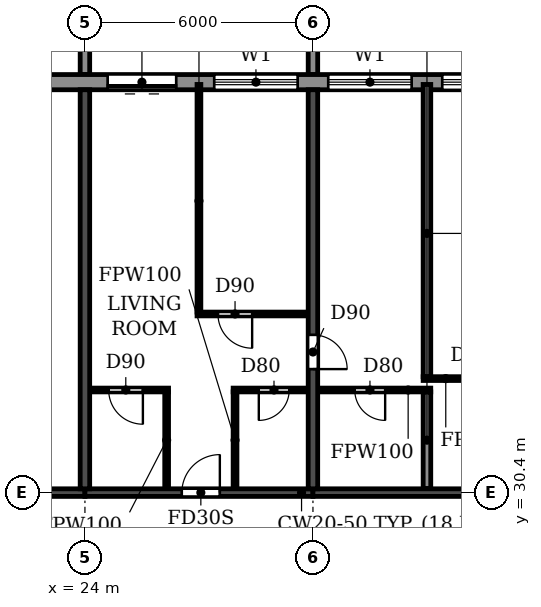
"""IFC4 building model, lengths in metres.
Left out: names, types, materials, properties, quantities, classifications, styles, units other than length and angle.
Written with IfcOpenShell. Run it as: python <this file> out.ifc"""

import sys

from ifc_helpers import new_model, si_unit, direction, frame, frame_2d, origin, place, context, subcontext, project, spatial, polyline, rectangle, outline, extrude, source, transform, mapped, element, fill, save


model = new_model("IFC4")
c1 = context("Model", 3, precision=1e-05, world=origin(), true_north=direction((0.0, 1.0)))
c2 = subcontext(c1, "Body", "Model", "MODEL_VIEW")
j1 = project(units=[si_unit("LENGTHUNIT", "METRE"), si_unit("PLANEANGLEUNIT", "RADIAN")], contexts=[c1])
p1 = place(None, origin())
s1 = spatial("IfcSite", under=j1, at=p1, CompositionType="ELEMENT")
p2 = place(p1, origin())
s2 = spatial("IfcBuilding", under=s1, at=p2, CompositionType="ELEMENT")
p3 = place(p2, frame((0.0, 0.0, 231.3)))
s3 = spatial("IfcBuildingStorey", under=s2, at=p3, CompositionType="ELEMENT", Elevation=231.3)
p4 = place(p3, frame((24.0, 30.5, 0.0), z_axis=(0.0, 0.0, 1.0), x_axis=(0.0, 1.0, 0.0)))
e1 = element("IfcWall", 1, at=p4, inside=s3, PredefinedType="SHEAR", context=c2, shape_type="SweptSolid", body=[
    extrude(rectangle(XDim=10.5, YDim=0.25, at=frame_2d((5.25, 0.0))), origin(), (0.0, 0.0, 1.0), 3.08),
])
p5 = place(p3, frame((30.0, 30.5, 0.0), z_axis=(0.0, 0.0, 1.0), x_axis=(0.0, 1.0, 0.0)))
e2 = element("IfcWall", 2, at=p5, inside=s3, PredefinedType="SHEAR", context=c2, shape_type="SweptSolid", body=[
    extrude(rectangle(XDim=10.5, YDim=0.25, at=frame_2d((5.25, 0.0))), origin(), (0.0, 0.0, 1.0), 3.08),
])
p6 = place(p5, frame((3.15, 0.0, 0.0)))
e3 = element("IfcOpeningElement", 3, at=p6, cuts=e2, PredefinedType="OPENING", context=c2, shape_type="SweptSolid", body=[
    extrude(rectangle(XDim=0.9, YDim=2.1, at=frame_2d((0.45, 1.05))), frame((0.0, 0.135, 0.0), z_axis=(0.0, -1.0, 0.0), x_axis=(1.0, 0.0, 0.0)), (0.0, 0.0, 1.0), 0.27),
])
p7 = place(p3, frame((18.2, 30.4, 0.0), z_axis=(0.0, 0.0, 1.0), x_axis=(1.0, 0.0, 0.0)))
e4 = element("IfcWall", 4, at=p7, inside=s3, PredefinedType="SHEAR", context=c2, shape_type="SweptSolid", body=[
    extrude(rectangle(XDim=5.8, YDim=0.2, at=frame_2d((2.9, 0.0))), origin(), (0.0, 0.0, 1.0), 2.48),
])
p8 = place(p7, frame((2.3, 0.0, 0.0)))
e5 = element("IfcOpeningElement", 5, at=p8, cuts=e4, PredefinedType="OPENING", context=c2, shape_type="SweptSolid", body=[
    extrude(rectangle(XDim=1.0, YDim=2.1, at=frame_2d((0.5, 1.05))), frame((0.0, 0.11, 0.0), z_axis=(0.0, -1.0, 0.0), x_axis=(1.0, 0.0, 0.0)), (0.0, 0.0, 1.0), 0.22),
])
p9 = place(p3, frame((24.0, 30.4, 0.0), z_axis=(0.0, 0.0, 1.0), x_axis=(1.0, 0.0, 0.0)))
e6 = element("IfcWall", 6, at=p9, inside=s3, PredefinedType="SHEAR", context=c2, shape_type="SweptSolid", body=[
    extrude(rectangle(XDim=6.0, YDim=0.2, at=frame_2d((3.0, 0.0))), origin(), (0.0, 0.0, 1.0), 2.48),
])
p10 = place(p9, frame((2.55, 0.0, 0.0)))
e7 = element("IfcOpeningElement", 7, at=p10, cuts=e6, PredefinedType="OPENING", context=c2, shape_type="SweptSolid", body=[
    extrude(rectangle(XDim=1.0, YDim=2.1, at=frame_2d((0.5, 1.05))), frame((0.0, 0.11, 0.0), z_axis=(0.0, -1.0, 0.0), x_axis=(1.0, 0.0, 0.0)), (0.0, 0.0, 1.0), 0.22),
])
p11 = place(p3, frame((30.0, 30.4, 0.0), z_axis=(0.0, 0.0, 1.0), x_axis=(1.0, 0.0, 0.0)))
e8 = element("IfcWall", 8, at=p11, inside=s3, PredefinedType="SHEAR", context=c2, shape_type="SweptSolid", body=[
    extrude(rectangle(XDim=6.0, YDim=0.2, at=frame_2d((3.0, 0.0))), origin(), (0.0, 0.0, 1.0), 2.48),
])
p12 = place(p3, frame((79.317, 41.2, 0.0), z_axis=(0.0, 0.0, 1.0), x_axis=(-1.0, 0.0, 0.0)))
e9 = element("IfcWall", 9, at=p12, inside=s3, PredefinedType="STANDARD", context=c2, shape_type="SweptSolid", body=[
    extrude(rectangle(XDim=56.634, YDim=0.4, at=frame_2d((28.317, 0.0))), origin(), (0.0, 0.0, 1.0), 3.08),
])
p13 = place(p12, frame((52.917, 0.0, 0.0)))
e10 = element("IfcOpeningElement", 10, at=p13, cuts=e9, PredefinedType="OPENING", context=c2, shape_type="SweptSolid", body=[
    extrude(rectangle(XDim=1.8, YDim=2.4, at=frame_2d((0.9, 1.2))), frame((0.0, 0.21, 0.0), z_axis=(0.0, -1.0, 0.0), x_axis=(1.0, 0.0, 0.0)), (0.0, 0.0, 1.0), 0.42),
])
p14 = place(p12, frame((49.717, 0.0, 0.9)))
e11 = element("IfcOpeningElement", 11, at=p14, cuts=e9, PredefinedType="OPENING", context=c2, shape_type="SweptSolid", body=[
    extrude(rectangle(XDim=2.2, YDim=1.5, at=frame_2d((1.1, 0.75))), frame((0.0, 0.21, 0.0), z_axis=(0.0, -1.0, 0.0), x_axis=(1.0, 0.0, 0.0)), (0.0, 0.0, 1.0), 0.42),
])
p15 = place(p12, frame((46.717, 0.0, 0.9)))
e12 = element("IfcOpeningElement", 12, at=p15, cuts=e9, PredefinedType="OPENING", context=c2, shape_type="SweptSolid", body=[
    extrude(rectangle(XDim=2.2, YDim=1.5, at=frame_2d((1.1, 0.75))), frame((0.0, 0.21, 0.0), z_axis=(0.0, -1.0, 0.0), x_axis=(1.0, 0.0, 0.0)), (0.0, 0.0, 1.0), 0.42),
])
p16 = place(p12, frame((43.717, 0.0, 0.9)))
e13 = element("IfcOpeningElement", 13, at=p16, cuts=e9, PredefinedType="OPENING", context=c2, shape_type="SweptSolid", body=[
    extrude(rectangle(XDim=2.2, YDim=1.5, at=frame_2d((1.1, 0.75))), frame((0.0, 0.21, 0.0), z_axis=(0.0, -1.0, 0.0), x_axis=(1.0, 0.0, 0.0)), (0.0, 0.0, 1.0), 0.42),
])
p17 = place(p12, frame((40.717, 0.0, 0.9)))
e14 = element("IfcOpeningElement", 14, at=p17, cuts=e9, PredefinedType="OPENING", context=c2, shape_type="SweptSolid", body=[
    extrude(rectangle(XDim=2.2, YDim=1.5, at=frame_2d((1.1, 0.75))), frame((0.0, 0.21, 0.0), z_axis=(0.0, -1.0, 0.0), x_axis=(1.0, 0.0, 0.0)), (0.0, 0.0, 1.0), 0.42),
])
p18 = place(p12, frame((37.917, 0.0, 0.0)))
e15 = element("IfcOpeningElement", 15, at=p18, cuts=e9, PredefinedType="OPENING", context=c2, shape_type="SweptSolid", body=[
    extrude(rectangle(XDim=1.8, YDim=2.4, at=frame_2d((0.9, 1.2))), frame((0.0, 0.21, 0.0), z_axis=(0.0, -1.0, 0.0), x_axis=(1.0, 0.0, 0.0)), (0.0, 0.0, 1.0), 0.42),
])
p19 = place(p12, frame((34.717, 0.0, 0.9)))
e16 = element("IfcOpeningElement", 16, at=p19, cuts=e9, PredefinedType="OPENING", context=c2, shape_type="SweptSolid", body=[
    extrude(rectangle(XDim=2.2, YDim=1.5, at=frame_2d((1.1, 0.75))), frame((0.0, 0.21, 0.0), z_axis=(0.0, -1.0, 0.0), x_axis=(1.0, 0.0, 0.0)), (0.0, 0.0, 1.0), 0.42),
])
p20 = place(p12, frame((31.917, 0.0, 0.0)))
e17 = element("IfcOpeningElement", 17, at=p20, cuts=e9, PredefinedType="OPENING", context=c2, shape_type="SweptSolid", body=[
    extrude(rectangle(XDim=1.8, YDim=2.4, at=frame_2d((0.9, 1.2))), frame((0.0, 0.21, 0.0), z_axis=(0.0, -1.0, 0.0), x_axis=(1.0, 0.0, 0.0)), (0.0, 0.0, 1.0), 0.42),
])
p21 = place(p12, frame((28.717, 0.0, 0.9)))
e18 = element("IfcOpeningElement", 18, at=p21, cuts=e9, PredefinedType="OPENING", context=c2, shape_type="SweptSolid", body=[
    extrude(rectangle(XDim=2.2, YDim=1.5, at=frame_2d((1.1, 0.75))), frame((0.0, 0.21, 0.0), z_axis=(0.0, -1.0, 0.0), x_axis=(1.0, 0.0, 0.0)), (0.0, 0.0, 1.0), 0.42),
])
p22 = place(p12, frame((25.917, 0.0, 0.0)))
e19 = element("IfcOpeningElement", 19, at=p22, cuts=e9, PredefinedType="OPENING", context=c2, shape_type="SweptSolid", body=[
    extrude(rectangle(XDim=1.8, YDim=2.4, at=frame_2d((0.9, 1.2))), frame((0.0, 0.21, 0.0), z_axis=(0.0, -1.0, 0.0), x_axis=(1.0, 0.0, 0.0)), (0.0, 0.0, 1.0), 0.42),
])
p23 = place(p12, frame((22.717, 0.0, 0.9)))
e20 = element("IfcOpeningElement", 20, at=p23, cuts=e9, PredefinedType="OPENING", context=c2, shape_type="SweptSolid", body=[
    extrude(rectangle(XDim=2.2, YDim=1.5, at=frame_2d((1.1, 0.75))), frame((0.0, 0.21, 0.0), z_axis=(0.0, -1.0, 0.0), x_axis=(1.0, 0.0, 0.0)), (0.0, 0.0, 1.0), 0.42),
])
p24 = place(p12, frame((19.717, 0.0, 0.9)))
e21 = element("IfcOpeningElement", 21, at=p24, cuts=e9, PredefinedType="OPENING", context=c2, shape_type="SweptSolid", body=[
    extrude(rectangle(XDim=2.2, YDim=1.5, at=frame_2d((1.1, 0.75))), frame((0.0, 0.21, 0.0), z_axis=(0.0, -1.0, 0.0), x_axis=(1.0, 0.0, 0.0)), (0.0, 0.0, 1.0), 0.42),
])
p25 = place(p12, frame((16.717, 0.0, 0.9)))
e22 = element("IfcOpeningElement", 22, at=p25, cuts=e9, PredefinedType="OPENING", context=c2, shape_type="SweptSolid", body=[
    extrude(rectangle(XDim=2.2, YDim=1.5, at=frame_2d((1.1, 0.75))), frame((0.0, 0.21, 0.0), z_axis=(0.0, -1.0, 0.0), x_axis=(1.0, 0.0, 0.0)), (0.0, 0.0, 1.0), 0.42),
])
p26 = place(p12, frame((13.917, 0.0, 0.0)))
e23 = element("IfcOpeningElement", 23, at=p26, cuts=e9, PredefinedType="OPENING", context=c2, shape_type="SweptSolid", body=[
    extrude(rectangle(XDim=1.8, YDim=2.4, at=frame_2d((0.9, 1.2))), frame((0.0, 0.21, 0.0), z_axis=(0.0, -1.0, 0.0), x_axis=(1.0, 0.0, 0.0)), (0.0, 0.0, 1.0), 0.42),
])
p27 = place(p12, frame((10.717, 0.0, 0.9)))
e24 = element("IfcOpeningElement", 24, at=p27, cuts=e9, PredefinedType="OPENING", context=c2, shape_type="SweptSolid", body=[
    extrude(rectangle(XDim=2.2, YDim=1.5, at=frame_2d((1.1, 0.75))), frame((0.0, 0.21, 0.0), z_axis=(0.0, -1.0, 0.0), x_axis=(1.0, 0.0, 0.0)), (0.0, 0.0, 1.0), 0.42),
])
p28 = place(p12, frame((7.917, 0.0, 0.0)))
e25 = element("IfcOpeningElement", 25, at=p28, cuts=e9, PredefinedType="OPENING", context=c2, shape_type="SweptSolid", body=[
    extrude(rectangle(XDim=1.8, YDim=2.4, at=frame_2d((0.9, 1.2))), frame((0.0, 0.21, 0.0), z_axis=(0.0, -1.0, 0.0), x_axis=(1.0, 0.0, 0.0)), (0.0, 0.0, 1.0), 0.42),
])
p29 = place(p12, frame((4.717, 0.0, 0.9)))
e26 = element("IfcOpeningElement", 26, at=p29, cuts=e9, PredefinedType="OPENING", context=c2, shape_type="SweptSolid", body=[
    extrude(rectangle(XDim=2.2, YDim=1.5, at=frame_2d((1.1, 0.75))), frame((0.0, 0.21, 0.0), z_axis=(0.0, -1.0, 0.0), x_axis=(1.0, 0.0, 0.0)), (0.0, 0.0, 1.0), 0.42),
])
p30 = place(p12, frame((1.917, 0.0, 0.0)))
e27 = element("IfcOpeningElement", 27, at=p30, cuts=e9, PredefinedType="OPENING", context=c2, shape_type="SweptSolid", body=[
    extrude(rectangle(XDim=1.8, YDim=2.4, at=frame_2d((0.9, 1.2))), frame((0.0, 0.21, 0.0), z_axis=(0.0, -1.0, 0.0), x_axis=(1.0, 0.0, 0.0)), (0.0, 0.0, 1.0), 0.42),
])
m1 = source(origin(), c2, "Body", "SweptSolid", [
    extrude(outline(polyline([(0.0, 0.0), (0.25, 0.0), (0.25, 3.1), (0.0, 3.1), (0.0, 0.0)])), origin(), (0.0, 0.0, 1.0), 3.1),
])
for number, where in (
    (28, (23.875, 41.4, 0.0)),
    (29, (29.875, 41.4, 0.0)),
):
    element("IfcWall", number, at=place(p3, frame(where)), inside=s3, PredefinedType="STANDARD", context=c2, shape_type="MappedRepresentation", body=[
        mapped(m1, transform((0.0, 0.0, 0.0))),
    ])
p31 = place(p3, frame((33.0, 30.51, 0.0), z_axis=(0.0, 0.0, 1.0), x_axis=(0.0, 1.0, 0.0)))
e30 = element("IfcWall", 30, at=p31, inside=s3, PredefinedType="PARTITIONING", context=c2, shape_type="SweptSolid", body=[
    extrude(rectangle(XDim=2.54, YDim=0.2, at=frame_2d((1.27, 0.0))), origin(), (0.0, 0.0, 1.0), 3.08),
])
p32 = place(p3, frame((33.0, 33.45, 0.0), z_axis=(0.0, 0.0, 1.0), x_axis=(0.0, 1.0, 0.0)))
e31 = element("IfcWall", 31, at=p32, inside=s3, PredefinedType="PARTITIONING", context=c2, shape_type="SweptSolid", body=[
    extrude(rectangle(XDim=7.69, YDim=0.2, at=frame_2d((3.845, 0.0))), origin(), (0.0, 0.0, 1.0), 3.08),
])
p33 = place(p3, frame((24.135, 33.1, 0.0), z_axis=(0.0, 0.0, 1.0), x_axis=(1.0, 0.0, 0.0)))
e32 = element("IfcWall", 32, at=p33, inside=s3, PredefinedType="PARTITIONING", context=c2, shape_type="SweptSolid", body=[
    extrude(rectangle(XDim=2.065, YDim=0.1, at=frame_2d((1.032, 0.0))), origin(), (0.0, 0.0, 1.0), 3.08),
])
p34 = place(p33, frame((0.49, 0.0, 0.0)))
e33 = element("IfcOpeningElement", 33, at=p34, cuts=e32, PredefinedType="OPENING", context=c2, shape_type="SweptSolid", body=[
    extrude(rectangle(XDim=0.9, YDim=2.1, at=frame_2d((0.45, 1.05))), frame((0.0, 0.06, 0.0), z_axis=(0.0, -1.0, 0.0), x_axis=(1.0, 0.0, 0.0)), (0.0, 0.0, 1.0), 0.12),
])
p35 = place(p3, frame((27.9, 33.1, 0.0), z_axis=(0.0, 0.0, 1.0), x_axis=(1.0, 0.0, 0.0)))
e34 = element("IfcWall", 34, at=p35, inside=s3, PredefinedType="PARTITIONING", context=c2, shape_type="SweptSolid", body=[
    extrude(rectangle(XDim=1.965, YDim=0.1, at=frame_2d((0.982, 0.0))), origin(), (0.0, 0.0, 1.0), 3.08),
])
p36 = place(p35, frame((0.675, 0.0, 0.0)))
e35 = element("IfcOpeningElement", 35, at=p36, cuts=e34, PredefinedType="OPENING", context=c2, shape_type="SweptSolid", body=[
    extrude(rectangle(XDim=0.8, YDim=2.1, at=frame_2d((0.4, 1.05))), frame((0.0, 0.06, 0.0), z_axis=(0.0, -1.0, 0.0), x_axis=(1.0, 0.0, 0.0)), (0.0, 0.0, 1.0), 0.12),
])
p37 = place(p3, frame((30.135, 33.1, 0.0), z_axis=(0.0, 0.0, 1.0), x_axis=(1.0, 0.0, 0.0)))
e36 = element("IfcWall", 36, at=p37, inside=s3, PredefinedType="PARTITIONING", context=c2, shape_type="SweptSolid", body=[
    extrude(rectangle(XDim=2.965, YDim=0.1, at=frame_2d((1.482, 0.0))), origin(), (0.0, 0.0, 1.0), 3.08),
])
p38 = place(p37, frame((0.965, 0.0, 0.0)))
e37 = element("IfcOpeningElement", 37, at=p38, cuts=e36, PredefinedType="OPENING", context=c2, shape_type="SweptSolid", body=[
    extrude(rectangle(XDim=0.8, YDim=2.1, at=frame_2d((0.4, 1.05))), frame((0.0, 0.06, 0.0), z_axis=(0.0, -1.0, 0.0), x_axis=(1.0, 0.0, 0.0)), (0.0, 0.0, 1.0), 0.12),
])
p39 = place(p3, frame((32.9, 33.4, 0.0), z_axis=(0.0, 0.0, 1.0), x_axis=(1.0, 0.0, 0.0)))
e38 = element("IfcWall", 38, at=p39, inside=s3, PredefinedType="PARTITIONING", context=c2, shape_type="SweptSolid", body=[
    extrude(rectangle(XDim=2.965, YDim=0.1, at=frame_2d((1.482, 0.0))), origin(), (0.0, 0.0, 1.0), 3.08),
])
p40 = place(p39, frame((1.2, 0.0, 0.0)))
e39 = element("IfcOpeningElement", 39, at=p40, cuts=e38, PredefinedType="OPENING", context=c2, shape_type="SweptSolid", body=[
    extrude(rectangle(XDim=0.8, YDim=2.1, at=frame_2d((0.4, 1.05))), frame((0.0, 0.06, 0.0), z_axis=(0.0, -1.0, 0.0), x_axis=(1.0, 0.0, 0.0)), (0.0, 0.0, 1.0), 0.12),
])
p41 = place(p3, frame((26.95, 35.1, 0.0), z_axis=(0.0, 0.0, 1.0), x_axis=(1.0, 0.0, 0.0)))
e40 = element("IfcWall", 40, at=p41, inside=s3, PredefinedType="PARTITIONING", context=c2, shape_type="SweptSolid", body=[
    extrude(rectangle(XDim=2.915, YDim=0.1, at=frame_2d((1.458, 0.0))), origin(), (0.0, 0.0, 1.0), 3.08),
])
p42 = place(p41, frame((0.55, 0.0, 0.0)))
e41 = element("IfcOpeningElement", 41, at=p42, cuts=e40, PredefinedType="OPENING", context=c2, shape_type="SweptSolid", body=[
    extrude(rectangle(XDim=0.9, YDim=2.1, at=frame_2d((0.45, 1.05))), frame((0.0, 0.06, 0.0), z_axis=(0.0, -1.0, 0.0), x_axis=(1.0, 0.0, 0.0)), (0.0, 0.0, 1.0), 0.12),
])
p43 = place(p3, frame((26.15, 30.51, 0.0), z_axis=(0.0, 0.0, 1.0), x_axis=(0.0, 1.0, 0.0)))
e42 = element("IfcWall", 42, at=p43, inside=s3, PredefinedType="PARTITIONING", context=c2, shape_type="SweptSolid", body=[
    extrude(rectangle(XDim=2.54, YDim=0.1, at=frame_2d((1.27, 0.0))), origin(), (0.0, 0.0, 1.0), 3.08),
])
p44 = place(p3, frame((27.0, 35.15, 0.0), z_axis=(0.0, 0.0, 1.0), x_axis=(0.0, 1.0, 0.0)))
e43 = element("IfcWall", 43, at=p44, inside=s3, PredefinedType="PARTITIONING", context=c2, shape_type="SweptSolid", body=[
    extrude(rectangle(XDim=5.99, YDim=0.1, at=frame_2d((2.995, 0.0))), origin(), (0.0, 0.0, 1.0), 3.08),
])
p45 = place(p3, frame((27.95, 30.51, 0.0), z_axis=(0.0, 0.0, 1.0), x_axis=(0.0, 1.0, 0.0)))
e44 = element("IfcWall", 44, at=p45, inside=s3, PredefinedType="PARTITIONING", context=c2, shape_type="SweptSolid", body=[
    extrude(rectangle(XDim=2.54, YDim=0.1, at=frame_2d((1.27, 0.0))), origin(), (0.0, 0.0, 1.0), 3.08),
])
p46 = place(p13, origin())
e45 = element("IfcDoor", 45, at=p46, inside=s3, OperationType="DOUBLE_DOOR_SLIDING", PredefinedType="DOOR", context=c2, shape_type="SweptSolid", body=[
    extrude(rectangle(XDim=1.8, YDim=2.4, at=frame_2d((0.9, 1.2))), frame((0.0, 0.025, 0.0), z_axis=(0.0, -1.0, 0.0), x_axis=(1.0, 0.0, 0.0)), (0.0, 0.0, 1.0), 0.05),
])
fill(e10, e45)
p47 = place(p14, origin())
e46 = element("IfcWindow", 46, at=p47, inside=s3, PartitioningType="DOUBLE_PANEL_HORIZONTAL", PredefinedType="WINDOW", context=c2, shape_type="SweptSolid", body=[
    extrude(rectangle(XDim=2.2, YDim=1.5, at=frame_2d((1.1, 0.75))), frame((0.0, 0.03, 0.0), z_axis=(0.0, -1.0, 0.0), x_axis=(1.0, 0.0, 0.0)), (0.0, 0.0, 1.0), 0.06),
])
fill(e11, e46)
p48 = place(p15, origin())
e47 = element("IfcWindow", 47, at=p48, inside=s3, PartitioningType="DOUBLE_PANEL_HORIZONTAL", PredefinedType="WINDOW", context=c2, shape_type="SweptSolid", body=[
    extrude(rectangle(XDim=2.2, YDim=1.5, at=frame_2d((1.1, 0.75))), frame((0.0, 0.03, 0.0), z_axis=(0.0, -1.0, 0.0), x_axis=(1.0, 0.0, 0.0)), (0.0, 0.0, 1.0), 0.06),
])
fill(e12, e47)
p49 = place(p16, origin())
e48 = element("IfcWindow", 48, at=p49, inside=s3, PartitioningType="DOUBLE_PANEL_HORIZONTAL", PredefinedType="WINDOW", context=c2, shape_type="SweptSolid", body=[
    extrude(rectangle(XDim=2.2, YDim=1.5, at=frame_2d((1.1, 0.75))), frame((0.0, 0.03, 0.0), z_axis=(0.0, -1.0, 0.0), x_axis=(1.0, 0.0, 0.0)), (0.0, 0.0, 1.0), 0.06),
])
fill(e13, e48)
p50 = place(p38, frame((0.8, 0.0, 0.0), z_axis=(0.0, 0.0, 1.0), x_axis=(-1.0, 0.0, 0.0)))
e49 = element("IfcDoor", 49, at=p50, inside=s3, OperationType="SINGLE_SWING_LEFT", PredefinedType="DOOR", context=c2, shape_type="SweptSolid", body=[
    extrude(rectangle(XDim=0.8, YDim=2.1, at=frame_2d((0.4, 1.05))), frame((0.0, 0.025, 0.0), z_axis=(0.0, -1.0, 0.0), x_axis=(1.0, 0.0, 0.0)), (0.0, 0.0, 1.0), 0.05),
])
fill(e37, e49)
p51 = place(p34, frame((0.9, 0.0, 0.0), z_axis=(0.0, 0.0, 1.0), x_axis=(-1.0, 0.0, 0.0)))
e50 = element("IfcDoor", 50, at=p51, inside=s3, OperationType="SINGLE_SWING_LEFT", PredefinedType="DOOR", context=c2, shape_type="SweptSolid", body=[
    extrude(rectangle(XDim=0.9, YDim=2.1, at=frame_2d((0.45, 1.05))), frame((0.0, 0.025, 0.0), z_axis=(0.0, -1.0, 0.0), x_axis=(1.0, 0.0, 0.0)), (0.0, 0.0, 1.0), 0.05),
])
fill(e33, e50)
p52 = place(p10, origin())
e51 = element("IfcDoor", 51, at=p52, inside=s3, OperationType="SINGLE_SWING_RIGHT", PredefinedType="DOOR", context=c2, shape_type="SweptSolid", body=[
    extrude(rectangle(XDim=1.0, YDim=2.1, at=frame_2d((0.5, 1.05))), frame((0.0, 0.025, 0.0), z_axis=(0.0, -1.0, 0.0), x_axis=(1.0, 0.0, 0.0)), (0.0, 0.0, 1.0), 0.05),
])
fill(e7, e51)
p53 = place(p42, frame((0.9, 0.0, 0.0), z_axis=(0.0, 0.0, 1.0), x_axis=(-1.0, 0.0, 0.0)))
e52 = element("IfcDoor", 52, at=p53, inside=s3, OperationType="SINGLE_SWING_LEFT", PredefinedType="DOOR", context=c2, shape_type="SweptSolid", body=[
    extrude(rectangle(XDim=0.9, YDim=2.1, at=frame_2d((0.45, 1.05))), frame((0.0, 0.025, 0.0), z_axis=(0.0, -1.0, 0.0), x_axis=(1.0, 0.0, 0.0)), (0.0, 0.0, 1.0), 0.05),
])
fill(e41, e52)
p54 = place(p36, frame((0.8, 0.0, 0.0), z_axis=(0.0, 0.0, 1.0), x_axis=(-1.0, 0.0, 0.0)))
e53 = element("IfcDoor", 53, at=p54, inside=s3, OperationType="SINGLE_SWING_RIGHT", PredefinedType="DOOR", context=c2, shape_type="SweptSolid", body=[
    extrude(rectangle(XDim=0.8, YDim=2.1, at=frame_2d((0.4, 1.05))), frame((0.0, 0.025, 0.0), z_axis=(0.0, -1.0, 0.0), x_axis=(1.0, 0.0, 0.0)), (0.0, 0.0, 1.0), 0.05),
])
fill(e35, e53)
p55 = place(p6, frame((0.9, 0.0, 0.0), z_axis=(0.0, 0.0, 1.0), x_axis=(-1.0, 0.0, 0.0)))
e54 = element("IfcDoor", 54, at=p55, inside=s3, OperationType="SINGLE_SWING_RIGHT", PredefinedType="DOOR", context=c2, shape_type="SweptSolid", body=[
    extrude(rectangle(XDim=0.9, YDim=2.1, at=frame_2d((0.45, 1.05))), frame((0.0, 0.025, 0.0), z_axis=(0.0, -1.0, 0.0), x_axis=(1.0, 0.0, 0.0)), (0.0, 0.0, 1.0), 0.05),
])
fill(e3, e54)
save(model, sys.argv[1])
